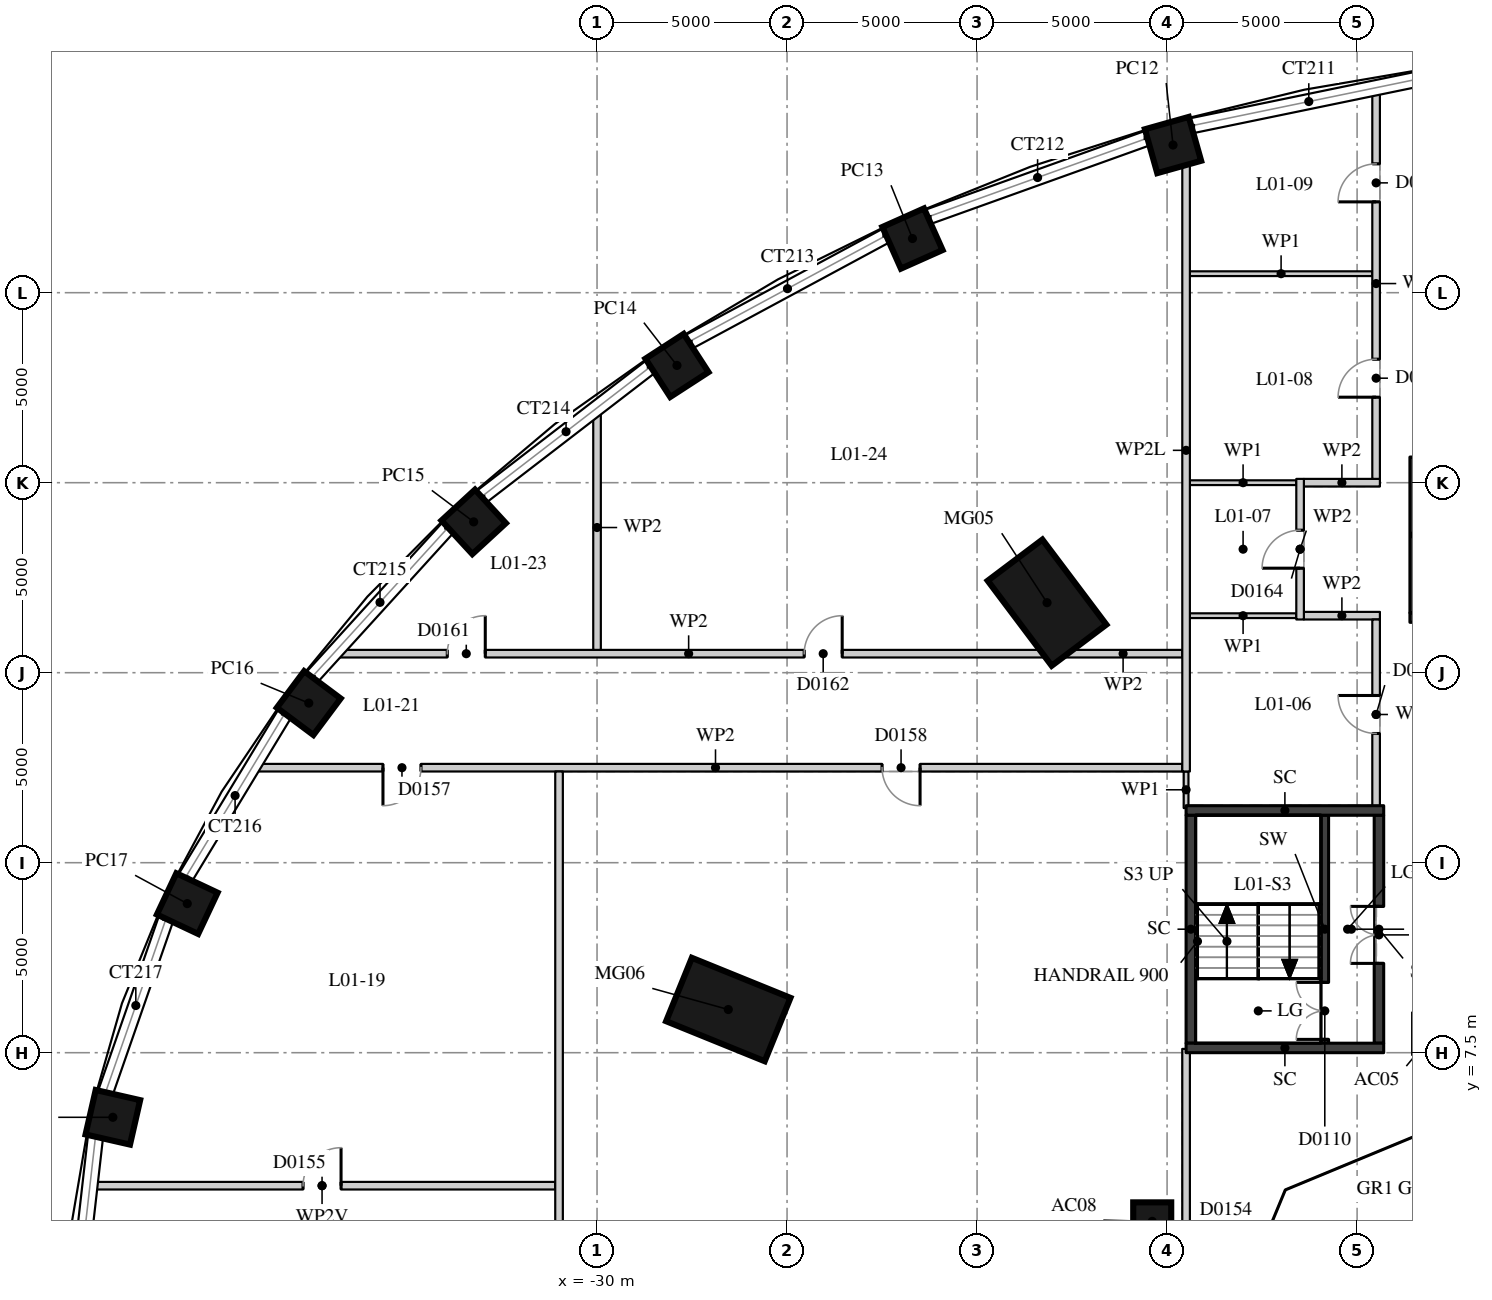
"""IFC4 building model, lengths in metres.
Left out: names, types, materials, properties, quantities, classifications, styles, units other than length and angle.
Written with IfcOpenShell. Run it as: python <this file> out.ifc"""

import sys

from ifc_helpers import new_model, si_unit, direction, frame, frame_2d, origin, origin_2d, place, context, subcontext, project, spatial, rectangle, extrude, element, fill, save


model = new_model("IFC4")
c1 = context("Model", 3, precision=1e-05, world=origin(), true_north=direction((0.0, 1.0)))
c2 = subcontext(c1, "Body", "Model", "MODEL_VIEW")
j1 = project(units=[si_unit("LENGTHUNIT", "METRE"), si_unit("PLANEANGLEUNIT", "RADIAN")], contexts=[c1])
p1 = place(None, origin())
s1 = spatial("IfcSite", under=j1, at=p1, CompositionType="ELEMENT")
p2 = place(p1, origin())
s2 = spatial("IfcBuilding", under=s1, at=p2, CompositionType="ELEMENT")
p3 = place(p2, frame((0.0, 0.0, 7.5)))
s3 = spatial("IfcBuildingStorey", under=s2, at=p3, CompositionType="ELEMENT", Elevation=7.5)
for number, where, z_axis, x_axis in (
    (1, (-18.159, 19.343, 0.0), (0.0, 0.0, 1.0), (-0.601, 0.799, 0.0)),
    (2, (-26.546, 8.636, 0.0), (0.0, 0.0, 1.0), (-0.927, 0.376, 0.0)),
):
    element("IfcColumn", number, at=place(p3, frame(where, z_axis=z_axis, x_axis=x_axis)), inside=s3, PredefinedType="COLUMN", context=c2, shape_type="SweptSolid", body=[
        extrude(rectangle(XDim=2.8, YDim=1.8, at=origin_2d()), origin(), (0.0, 0.0, 1.0), 5.0),
    ])
p4 = place(p3, frame((-15.391, 3.062, 0.0), z_axis=(0.0, 0.0, 1.0), x_axis=(1.0, 0.0, 0.0)))
e3 = element("IfcColumn", 3, at=p4, inside=s3, PredefinedType="COLUMN", context=c2, shape_type="SweptSolid", body=[
    extrude(rectangle(XDim=1.0, YDim=1.0, at=origin_2d()), origin(), (0.0, 0.0, 1.0), 5.0),
])
for number, where, z_axis, x_axis in (
    (4, (-14.844, 31.386, 0.0), (0.0, 0.0, 1.0), (-0.271, 0.963, 0.0)),
    (5, (-21.7, 28.925, 0.0), (0.0, 0.0, 1.0), (-0.407, 0.913, 0.0)),
    (6, (-27.897, 25.586, 0.0), (0.0, 0.0, 1.0), (-0.544, 0.839, 0.0)),
    (7, (-33.246, 21.469, 0.0), (0.0, 0.0, 1.0), (-0.677, 0.736, 0.0)),
    (8, (-37.585, 16.7, 0.0), (0.0, 0.0, 1.0), (-0.801, 0.599, 0.0)),
    (9, (-40.783, 11.424, 0.0), (0.0, 0.0, 1.0), (-0.905, 0.426, 0.0)),
    (10, (-42.741, 5.8, 0.0), (0.0, 0.0, 1.0), (-0.975, 0.222, 0.0)),
):
    element("IfcColumn", number, at=place(p3, frame(where, z_axis=z_axis, x_axis=x_axis)), inside=s3, PredefinedType="COLUMN", context=c2, shape_type="SweptSolid", body=[
        extrude(rectangle(XDim=1.2, YDim=1.2, at=origin_2d()), origin(), (0.0, 0.0, 1.0), 5.0),
    ])
p5 = place(p3, frame((-10.85, 7.75, 0.0), z_axis=(0.0, 0.0, 1.0), x_axis=(0.0, 1.0, 0.0)))
e11 = element("IfcWall", 11, at=p5, inside=s3, PredefinedType="SHEAR", context=c2, shape_type="SweptSolid", body=[
    extrude(rectangle(XDim=6.0, YDim=0.2, at=frame_2d((3.0, 0.0))), origin(), (0.0, 0.0, 1.0), 4.59),
])
p6 = place(p5, frame((0.1, 0.0, 0.0)))
e12 = element("IfcOpeningElement", 12, at=p6, cuts=e11, PredefinedType="OPENING", context=c2, shape_type="SweptSolid", body=[
    extrude(rectangle(XDim=1.5, YDim=2.1, at=frame_2d((0.75, 1.05))), frame((0.0, 0.11, 0.0), z_axis=(0.0, -1.0, 0.0), x_axis=(1.0, 0.0, 0.0)), (0.0, 0.0, 1.0), 0.22),
])
p7 = place(p3, frame((-14.375, 7.75, -0.41), z_axis=(0.0, 0.0, 1.0), x_axis=(0.0, 1.0, 0.0)))
e13 = element("IfcWall", 13, at=p7, inside=s3, PredefinedType="SHEAR", context=c2, shape_type="SweptSolid", body=[
    extrude(rectangle(XDim=6.0, YDim=0.25, at=frame_2d((3.0, 0.0))), origin(), (0.0, 0.0, 1.0), 5.0),
])
p8 = place(p3, frame((-9.425, 7.75, -0.41), z_axis=(0.0, 0.0, 1.0), x_axis=(0.0, 1.0, 0.0)))
e14 = element("IfcWall", 14, at=p8, inside=s3, PredefinedType="SHEAR", context=c2, shape_type="SweptSolid", body=[
    extrude(rectangle(XDim=6.0, YDim=0.25, at=frame_2d((3.0, 0.0))), origin(), (0.0, 0.0, 1.0), 5.0),
])
p9 = place(p8, frame((2.1, 0.0, 0.41)))
e15 = element("IfcOpeningElement", 15, at=p9, cuts=e14, PredefinedType="OPENING", context=c2, shape_type="SweptSolid", body=[
    extrude(rectangle(XDim=1.5, YDim=2.1, at=frame_2d((0.75, 1.05))), frame((0.0, 0.135, 0.0), z_axis=(0.0, -1.0, 0.0), x_axis=(1.0, 0.0, 0.0)), (0.0, 0.0, 1.0), 0.27),
])
for number, where, z_axis, x_axis in (
    (16, (-14.5, 13.875, -0.41), (0.0, 0.0, 1.0), (1.0, 0.0, 0.0)),
    (17, (-14.5, 7.625, -0.41), (0.0, 0.0, 1.0), (1.0, 0.0, 0.0)),
):
    element("IfcWall", number, at=place(p3, frame(where, z_axis=z_axis, x_axis=x_axis)), inside=s3, PredefinedType="SHEAR", context=c2, shape_type="SweptSolid", body=[
        extrude(rectangle(XDim=5.2, YDim=0.25, at=frame_2d((2.6, 0.0))), origin(), (0.0, 0.0, 1.0), 5.0),
    ])
p10 = place(p3, frame((-43.372, 4.0, 0.0), z_axis=(0.0, 0.0, 1.0), x_axis=(1.0, 0.0, 0.0)))
e18 = element("IfcWall", 18, at=p10, inside=s3, PredefinedType="PARTITIONING", context=c2, shape_type="SweptSolid", body=[
    extrude(rectangle(XDim=12.271, YDim=0.2, at=frame_2d((6.136, 0.0))), origin(), (0.0, 0.0, 1.0), 3.59),
])
p11 = place(p10, frame((5.635, 0.0, 0.0)))
e19 = element("IfcOpeningElement", 19, at=p11, cuts=e18, PredefinedType="OPENING", context=c2, shape_type="SweptSolid", body=[
    extrude(rectangle(XDim=1.0, YDim=2.1, at=frame_2d((0.5, 1.05))), frame((0.0, 0.11, 0.0), z_axis=(0.0, -1.0, 0.0), x_axis=(1.0, 0.0, 0.0)), (0.0, 0.0, 1.0), 0.22),
])
p12 = place(p3, frame((-39.165, 15.0, 0.0), z_axis=(0.0, 0.0, 1.0), x_axis=(1.0, 0.0, 0.0)))
e20 = element("IfcWall", 20, at=p12, inside=s3, PredefinedType="PARTITIONING", context=c2, shape_type="SweptSolid", body=[
    extrude(rectangle(XDim=24.565, YDim=0.2, at=frame_2d((12.283, 0.0))), origin(), (0.0, 0.0, 1.0), 4.59),
])
p13 = place(p12, frame((3.532, 0.0, 0.0)))
e21 = element("IfcOpeningElement", 21, at=p13, cuts=e20, PredefinedType="OPENING", context=c2, shape_type="SweptSolid", body=[
    extrude(rectangle(XDim=1.0, YDim=2.1, at=frame_2d((0.5, 1.05))), frame((0.0, 0.11, 0.0), z_axis=(0.0, -1.0, 0.0), x_axis=(1.0, 0.0, 0.0)), (0.0, 0.0, 1.0), 0.22),
])
p14 = place(p12, frame((16.665, 0.0, 0.0)))
e22 = element("IfcOpeningElement", 22, at=p14, cuts=e20, PredefinedType="OPENING", context=c2, shape_type="SweptSolid", body=[
    extrude(rectangle(XDim=1.0, YDim=2.1, at=frame_2d((0.5, 1.05))), frame((0.0, 0.11, 0.0), z_axis=(0.0, -1.0, 0.0), x_axis=(1.0, 0.0, 0.0)), (0.0, 0.0, 1.0), 0.22),
])
p15 = place(p3, frame((-36.982, 18.0, 0.0), z_axis=(0.0, 0.0, 1.0), x_axis=(1.0, 0.0, 0.0)))
e23 = element("IfcWall", 23, at=p15, inside=s3, PredefinedType="PARTITIONING", context=c2, shape_type="SweptSolid", body=[
    extrude(rectangle(XDim=18.784, YDim=0.2, at=frame_2d((9.392, 0.0))), origin(), (0.0, 0.0, 1.0), 4.59),
])
p16 = place(p15, frame((3.041, 0.0, 0.0)))
e24 = element("IfcOpeningElement", 24, at=p16, cuts=e23, PredefinedType="OPENING", context=c2, shape_type="SweptSolid", body=[
    extrude(rectangle(XDim=1.0, YDim=2.1, at=frame_2d((0.5, 1.05))), frame((0.0, 0.11, 0.0), z_axis=(0.0, -1.0, 0.0), x_axis=(1.0, 0.0, 0.0)), (0.0, 0.0, 1.0), 0.22),
])
p17 = place(p15, frame((12.433, 0.0, 0.0)))
e25 = element("IfcOpeningElement", 25, at=p17, cuts=e23, PredefinedType="OPENING", context=c2, shape_type="SweptSolid", body=[
    extrude(rectangle(XDim=1.0, YDim=2.1, at=frame_2d((0.5, 1.05))), frame((0.0, 0.11, 0.0), z_axis=(0.0, -1.0, 0.0), x_axis=(1.0, 0.0, 0.0)), (0.0, 0.0, 1.0), 0.22),
])
p18 = place(p3, frame((-17.715, 18.0, 0.0), z_axis=(0.0, 0.0, 1.0), x_axis=(1.0, 0.0, 0.0)))
e26 = element("IfcWall", 26, at=p18, inside=s3, PredefinedType="PARTITIONING", context=c2, shape_type="SweptSolid", body=[
    extrude(rectangle(XDim=3.115, YDim=0.2, at=frame_2d((1.557, 0.0))), origin(), (0.0, 0.0, 1.0), 4.59),
])
p19 = place(p3, frame((-8.61, 18.95, 0.0), z_axis=(0.0, 0.0, 1.0), x_axis=(1.0, 0.0, 0.0)))
e27 = element("IfcWall", 27, at=p19, inside=s3, PredefinedType="SOLIDWALL", context=c2, shape_type="SweptSolid", body=[
    extrude(rectangle(XDim=9.22, YDim=0.25, at=frame_2d((4.61, 0.0))), origin(), (0.0, 0.0, 1.0), 4.59),
])
p20 = place(p3, frame((-14.4, 19.0, 0.0), z_axis=(0.0, 0.0, 1.0), x_axis=(1.0, 0.0, 0.0)))
e28 = element("IfcWall", 28, at=p20, inside=s3, PredefinedType="PARTITIONING", context=c2, shape_type="SweptSolid", body=[
    extrude(rectangle(XDim=2.8, YDim=0.125, at=frame_2d((1.4, 0.0))), origin(), (0.0, 0.0, 1.0), 4.59),
])
p21 = place(p3, frame((-11.4, 19.0, 0.0), z_axis=(0.0, 0.0, 1.0), x_axis=(1.0, 0.0, 0.0)))
e29 = element("IfcWall", 29, at=p21, inside=s3, PredefinedType="PARTITIONING", context=c2, shape_type="SweptSolid", body=[
    extrude(rectangle(XDim=2.0, YDim=0.2, at=frame_2d((1.0, 0.0))), origin(), (0.0, 0.0, 1.0), 4.59),
])
p22 = place(p3, frame((-14.4, 22.5, 0.0), z_axis=(0.0, 0.0, 1.0), x_axis=(1.0, 0.0, 0.0)))
e30 = element("IfcWall", 30, at=p22, inside=s3, PredefinedType="PARTITIONING", context=c2, shape_type="SweptSolid", body=[
    extrude(rectangle(XDim=2.8, YDim=0.125, at=frame_2d((1.4, 0.0))), origin(), (0.0, 0.0, 1.0), 4.59),
])
p23 = place(p3, frame((-11.4, 22.5, 0.0), z_axis=(0.0, 0.0, 1.0), x_axis=(1.0, 0.0, 0.0)))
e31 = element("IfcWall", 31, at=p23, inside=s3, PredefinedType="PARTITIONING", context=c2, shape_type="SweptSolid", body=[
    extrude(rectangle(XDim=2.0, YDim=0.2, at=frame_2d((1.0, 0.0))), origin(), (0.0, 0.0, 1.0), 4.59),
])
p24 = place(p3, frame((-14.4, 28.0, 0.0), z_axis=(0.0, 0.0, 1.0), x_axis=(1.0, 0.0, 0.0)))
e32 = element("IfcWall", 32, at=p24, inside=s3, PredefinedType="PARTITIONING", context=c2, shape_type="SweptSolid", body=[
    extrude(rectangle(XDim=4.8, YDim=0.125, at=frame_2d((2.4, 0.0))), origin(), (0.0, 0.0, 1.0), 4.59),
])
p25 = place(p3, frame((-31.0, -14.9, 0.0), z_axis=(0.0, 0.0, 1.0), x_axis=(0.0, 1.0, 0.0)))
e33 = element("IfcWall", 33, at=p25, inside=s3, PredefinedType="PARTITIONING", context=c2, shape_type="SweptSolid", body=[
    extrude(rectangle(XDim=29.8, YDim=0.2, at=frame_2d((14.9, 0.0))), origin(), (0.0, 0.0, 1.0), 4.59),
])
p26 = place(p25, frame((6.0, 0.0, 0.0)))
e34 = element("IfcOpeningElement", 34, at=p26, cuts=e33, PredefinedType="OPENING", context=c2, shape_type="SweptSolid", body=[
    extrude(rectangle(XDim=1.8, YDim=2.1, at=frame_2d((0.9, 1.05))), frame((0.0, 0.11, 0.0), z_axis=(0.0, -1.0, 0.0), x_axis=(1.0, 0.0, 0.0)), (0.0, 0.0, 1.0), 0.22),
])
p27 = place(p3, frame((-30.0, 18.1, 0.0), z_axis=(0.0, 0.0, 1.0), x_axis=(0.0, 1.0, 0.0)))
e35 = element("IfcWall", 35, at=p27, inside=s3, PredefinedType="PARTITIONING", context=c2, shape_type="SweptSolid", body=[
    extrude(rectangle(XDim=6.44, YDim=0.2, at=frame_2d((3.22, 0.0))), origin(), (0.0, 0.0, 1.0), 4.59),
])
p28 = place(p3, frame((-14.5, -6.55, 0.0), z_axis=(0.0, 0.0, 1.0), x_axis=(0.0, 1.0, 0.0)))
e36 = element("IfcWall", 36, at=p28, inside=s3, PredefinedType="PARTITIONING", context=c2, shape_type="SweptSolid", body=[
    extrude(rectangle(XDim=14.15, YDim=0.2, at=frame_2d((7.075, 0.0))), origin(), (0.0, 0.0, 1.0), 4.59),
])
p29 = place(p28, frame((7.175, 0.0, 0.0)))
e37 = element("IfcOpeningElement", 37, at=p29, cuts=e36, PredefinedType="OPENING", context=c2, shape_type="SweptSolid", body=[
    extrude(rectangle(XDim=1.8, YDim=2.4, at=frame_2d((0.9, 1.2))), frame((0.0, 0.11, 0.0), z_axis=(0.0, -1.0, 0.0), x_axis=(1.0, 0.0, 0.0)), (0.0, 0.0, 1.0), 0.22),
])
p30 = place(p3, frame((-14.5, 13.938, 0.0), z_axis=(0.0, 0.0, 1.0), x_axis=(0.0, 1.0, 0.0)))
e38 = element("IfcWall", 38, at=p30, inside=s3, PredefinedType="PARTITIONING", context=c2, shape_type="SweptSolid", body=[
    extrude(rectangle(XDim=0.962, YDim=0.125, at=frame_2d((0.481, 0.0))), origin(), (0.0, 0.0, 1.0), 4.59),
])
p31 = place(p3, frame((-14.5, 14.9, 0.0), z_axis=(0.0, 0.0, 1.0), x_axis=(0.0, 1.0, 0.0)))
e39 = element("IfcWall", 39, at=p31, inside=s3, PredefinedType="PARTITIONING", context=c2, shape_type="SweptSolid", body=[
    extrude(rectangle(XDim=16.903, YDim=0.2, at=frame_2d((8.452, 0.0))), origin(), (0.0, 0.0, 1.0), 4.14),
])
p32 = place(p3, frame((-11.5, 18.9, 0.0), z_axis=(0.0, 0.0, 1.0), x_axis=(0.0, 1.0, 0.0)))
e40 = element("IfcWall", 40, at=p32, inside=s3, PredefinedType="PARTITIONING", context=c2, shape_type="SweptSolid", body=[
    extrude(rectangle(XDim=3.7, YDim=0.2, at=frame_2d((1.85, 0.0))), origin(), (0.0, 0.0, 1.0), 4.59),
])
p33 = place(p32, frame((1.35, 0.0, 0.0)))
e41 = element("IfcOpeningElement", 41, at=p33, cuts=e40, PredefinedType="OPENING", context=c2, shape_type="SweptSolid", body=[
    extrude(rectangle(XDim=1.0, YDim=2.1, at=frame_2d((0.5, 1.05))), frame((0.0, 0.11, 0.0), z_axis=(0.0, -1.0, 0.0), x_axis=(1.0, 0.0, 0.0)), (0.0, 0.0, 1.0), 0.22),
])
p34 = place(p3, frame((-9.5, 13.9, 0.0), z_axis=(0.0, 0.0, 1.0), x_axis=(0.0, 1.0, 0.0)))
e42 = element("IfcWall", 42, at=p34, inside=s3, PredefinedType="PARTITIONING", context=c2, shape_type="SweptSolid", body=[
    extrude(rectangle(XDim=5.0, YDim=0.2, at=frame_2d((2.5, 0.0))), origin(), (0.0, 0.0, 1.0), 4.04),
])
p35 = place(p34, frame((2.0, 0.0, 0.0)))
e43 = element("IfcOpeningElement", 43, at=p35, cuts=e42, PredefinedType="OPENING", context=c2, shape_type="SweptSolid", body=[
    extrude(rectangle(XDim=1.0, YDim=2.1, at=frame_2d((0.5, 1.05))), frame((0.0, 0.11, 0.0), z_axis=(0.0, -1.0, 0.0), x_axis=(1.0, 0.0, 0.0)), (0.0, 0.0, 1.0), 0.22),
])
p36 = place(p3, frame((-9.5, 22.6, 0.0), z_axis=(0.0, 0.0, 1.0), x_axis=(0.0, 1.0, 0.0)))
e44 = element("IfcWall", 44, at=p36, inside=s3, PredefinedType="PARTITIONING", context=c2, shape_type="SweptSolid", body=[
    extrude(rectangle(XDim=10.281, YDim=0.2, at=frame_2d((5.14, 0.0))), origin(), (0.0, 0.0, 1.0), 4.59),
])
p37 = place(p36, frame((2.15, 0.0, 0.0)))
e45 = element("IfcOpeningElement", 45, at=p37, cuts=e44, PredefinedType="OPENING", context=c2, shape_type="SweptSolid", body=[
    extrude(rectangle(XDim=1.0, YDim=2.1, at=frame_2d((0.5, 1.05))), frame((0.0, 0.11, 0.0), z_axis=(0.0, -1.0, 0.0), x_axis=(1.0, 0.0, 0.0)), (0.0, 0.0, 1.0), 0.22),
])
p38 = place(p36, frame((7.29, 0.0, 0.0)))
e46 = element("IfcOpeningElement", 46, at=p38, cuts=e44, PredefinedType="OPENING", context=c2, shape_type="SweptSolid", body=[
    extrude(rectangle(XDim=1.0, YDim=2.1, at=frame_2d((0.5, 1.05))), frame((0.0, 0.11, 0.0), z_axis=(0.0, -1.0, 0.0), x_axis=(1.0, 0.0, 0.0)), (0.0, 0.0, 1.0), 0.22),
])
p39 = place(p3, frame((-8.485, 19.075, 0.0), z_axis=(0.0, 0.0, 1.0), x_axis=(0.0, 1.0, 0.0)))
e47 = element("IfcWall", 47, at=p39, inside=s3, PredefinedType="SOLIDWALL", context=c2, shape_type="SweptSolid", body=[
    extrude(rectangle(XDim=4.1, YDim=0.25, at=frame_2d((2.05, 0.0))), origin(), (0.0, 0.0, 1.0), 4.59),
])
p40 = place(p6, origin())
e48 = element("IfcDoor", 48, at=p40, inside=s3, OperationType="DOUBLE_DOOR_SINGLE_SWING", PredefinedType="DOOR", context=c2, shape_type="SweptSolid", body=[
    extrude(rectangle(XDim=1.5, YDim=2.1, at=frame_2d((0.75, 1.05))), frame((0.0, 0.025, 0.0), z_axis=(0.0, -1.0, 0.0), x_axis=(1.0, 0.0, 0.0)), (0.0, 0.0, 1.0), 0.05),
])
fill(e12, e48)
p41 = place(p9, origin())
e49 = element("IfcDoor", 49, at=p41, inside=s3, OperationType="DOUBLE_DOOR_SINGLE_SWING", PredefinedType="DOOR", context=c2, shape_type="SweptSolid", body=[
    extrude(rectangle(XDim=1.5, YDim=2.1, at=frame_2d((0.75, 1.05))), frame((0.0, 0.025, 0.0), z_axis=(0.0, -1.0, 0.0), x_axis=(1.0, 0.0, 0.0)), (0.0, 0.0, 1.0), 0.05),
])
fill(e15, e49)
p42 = place(p11, origin())
e50 = element("IfcDoor", 50, at=p42, inside=s3, OperationType="SINGLE_SWING_RIGHT", PredefinedType="DOOR", context=c2, shape_type="SweptSolid", body=[
    extrude(rectangle(XDim=1.0, YDim=2.1, at=frame_2d((0.5, 1.05))), frame((0.0, 0.025, 0.0), z_axis=(0.0, -1.0, 0.0), x_axis=(1.0, 0.0, 0.0)), (0.0, 0.0, 1.0), 0.05),
])
fill(e19, e50)
p43 = place(p13, origin())
e51 = element("IfcDoor", 51, at=p43, inside=s3, OperationType="SINGLE_SWING_RIGHT", PredefinedType="DOOR", context=c2, shape_type="SweptSolid", body=[
    extrude(rectangle(XDim=1.0, YDim=2.1, at=frame_2d((0.5, 1.05))), frame((0.0, 0.025, 0.0), z_axis=(0.0, -1.0, 0.0), x_axis=(1.0, 0.0, 0.0)), (0.0, 0.0, 1.0), 0.05),
])
fill(e21, e51)
p44 = place(p14, origin())
e52 = element("IfcDoor", 52, at=p44, inside=s3, OperationType="SINGLE_SWING_LEFT", PredefinedType="DOOR", context=c2, shape_type="SweptSolid", body=[
    extrude(rectangle(XDim=1.0, YDim=2.1, at=frame_2d((0.5, 1.05))), frame((0.0, 0.025, 0.0), z_axis=(0.0, -1.0, 0.0), x_axis=(1.0, 0.0, 0.0)), (0.0, 0.0, 1.0), 0.05),
])
fill(e22, e52)
p45 = place(p16, origin())
e53 = element("IfcDoor", 53, at=p45, inside=s3, OperationType="SINGLE_SWING_RIGHT", PredefinedType="DOOR", context=c2, shape_type="SweptSolid", body=[
    extrude(rectangle(XDim=1.0, YDim=2.1, at=frame_2d((0.5, 1.05))), frame((0.0, 0.025, 0.0), z_axis=(0.0, -1.0, 0.0), x_axis=(1.0, 0.0, 0.0)), (0.0, 0.0, 1.0), 0.05),
])
fill(e24, e53)
p46 = place(p17, origin())
e54 = element("IfcDoor", 54, at=p46, inside=s3, OperationType="SINGLE_SWING_RIGHT", PredefinedType="DOOR", context=c2, shape_type="SweptSolid", body=[
    extrude(rectangle(XDim=1.0, YDim=2.1, at=frame_2d((0.5, 1.05))), frame((0.0, 0.025, 0.0), z_axis=(0.0, -1.0, 0.0), x_axis=(1.0, 0.0, 0.0)), (0.0, 0.0, 1.0), 0.05),
])
fill(e25, e54)
p47 = place(p35, origin())
e55 = element("IfcDoor", 55, at=p47, inside=s3, OperationType="SINGLE_SWING_RIGHT", PredefinedType="DOOR", context=c2, shape_type="SweptSolid", body=[
    extrude(rectangle(XDim=1.0, YDim=2.1, at=frame_2d((0.5, 1.05))), frame((0.0, 0.025, 0.0), z_axis=(0.0, -1.0, 0.0), x_axis=(1.0, 0.0, 0.0)), (0.0, 0.0, 1.0), 0.05),
])
fill(e43, e55)
p48 = place(p33, origin())
e56 = element("IfcDoor", 56, at=p48, inside=s3, OperationType="SINGLE_SWING_LEFT", PredefinedType="DOOR", context=c2, shape_type="SweptSolid", body=[
    extrude(rectangle(XDim=1.0, YDim=2.1, at=frame_2d((0.5, 1.05))), frame((0.0, 0.025, 0.0), z_axis=(0.0, -1.0, 0.0), x_axis=(1.0, 0.0, 0.0)), (0.0, 0.0, 1.0), 0.05),
])
fill(e41, e56)
p49 = place(p37, origin())
e57 = element("IfcDoor", 57, at=p49, inside=s3, OperationType="SINGLE_SWING_LEFT", PredefinedType="DOOR", context=c2, shape_type="SweptSolid", body=[
    extrude(rectangle(XDim=1.0, YDim=2.1, at=frame_2d((0.5, 1.05))), frame((0.0, 0.025, 0.0), z_axis=(0.0, -1.0, 0.0), x_axis=(1.0, 0.0, 0.0)), (0.0, 0.0, 1.0), 0.05),
])
fill(e45, e57)
p50 = place(p38, origin())
e58 = element("IfcDoor", 58, at=p50, inside=s3, OperationType="SINGLE_SWING_LEFT", PredefinedType="DOOR", context=c2, shape_type="SweptSolid", body=[
    extrude(rectangle(XDim=1.0, YDim=2.1, at=frame_2d((0.5, 1.05))), frame((0.0, 0.025, 0.0), z_axis=(0.0, -1.0, 0.0), x_axis=(1.0, 0.0, 0.0)), (0.0, 0.0, 1.0), 0.05),
])
fill(e46, e58)
save(model, sys.argv[1])
